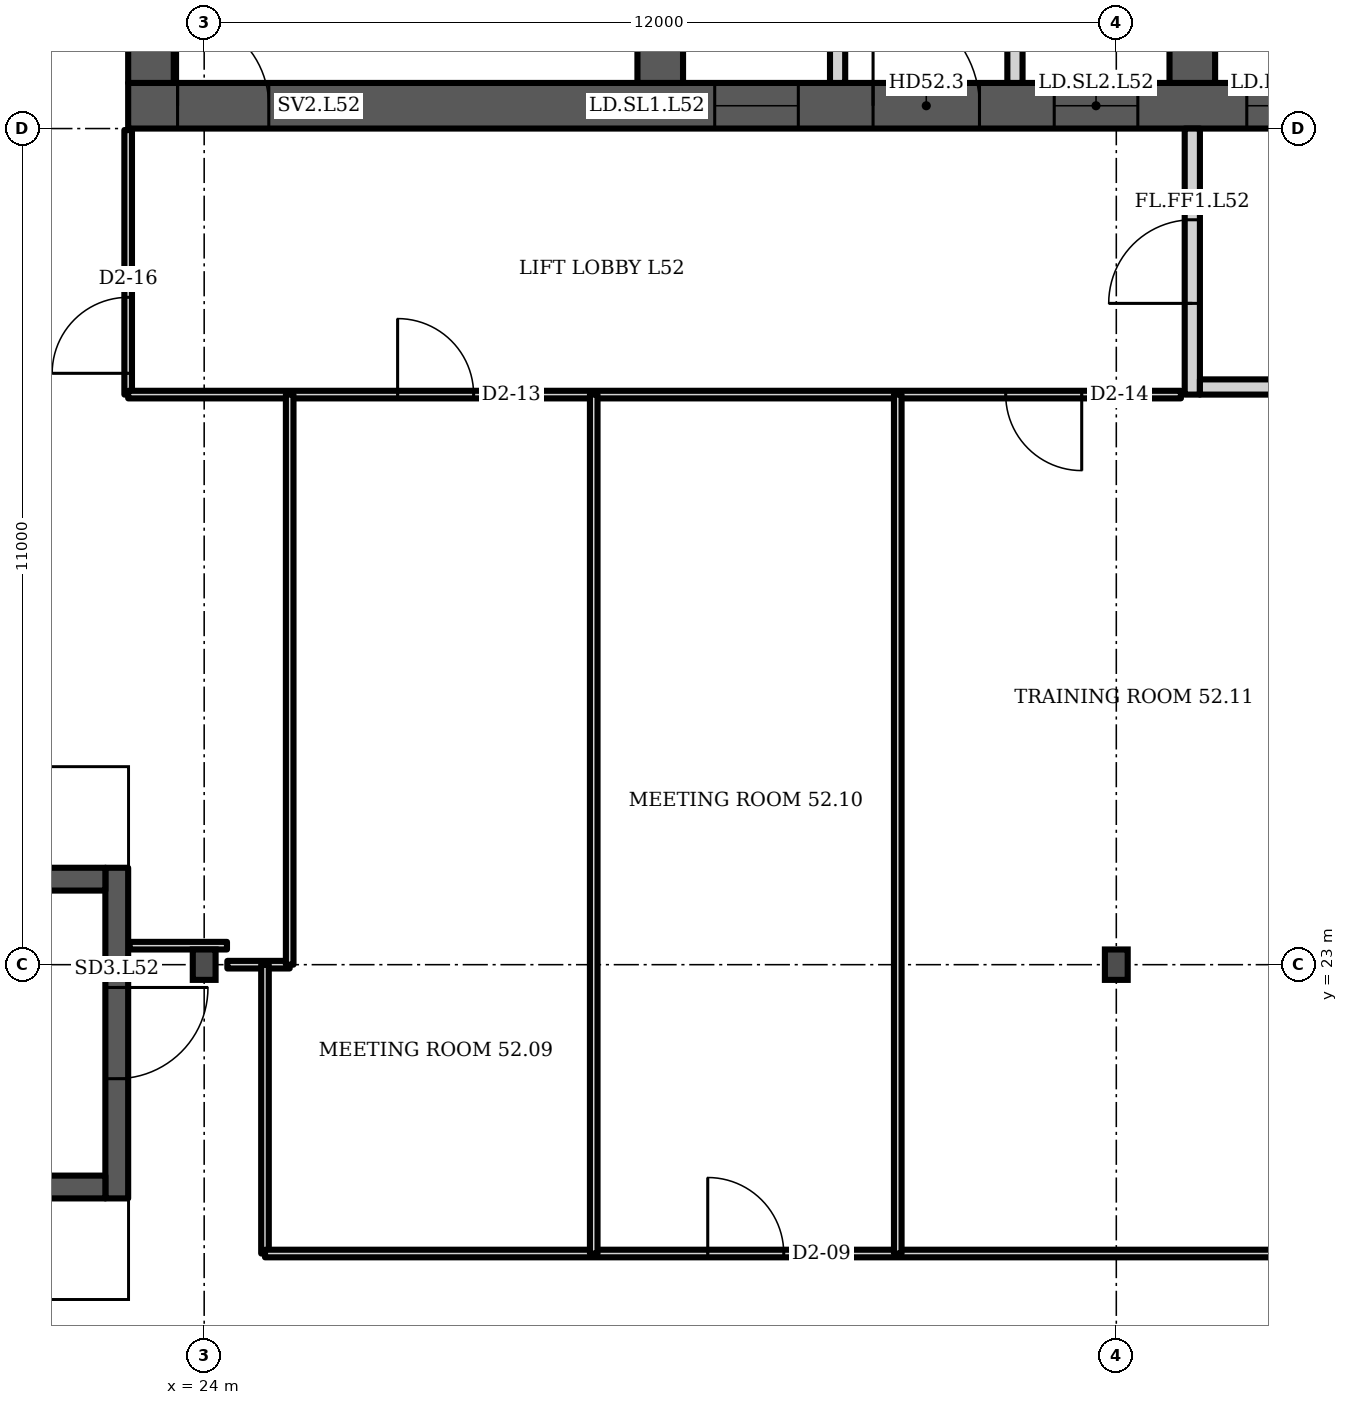
"""IFC4 building model, lengths in metres.
Left out: names, types, materials, properties, quantities, classifications, styles, units other than length and angle.
Written with IfcOpenShell. Run it as: python <this file> out.ifc"""

import sys

from ifc_helpers import new_model, si_unit, direction, frame, frame_2d, origin, origin_2d, place, context, subcontext, project, spatial, polyline, rectangle, i_section, outline, extrude, element, fill, save


model = new_model("IFC4")
c1 = context("Model", 3, precision=1e-05, world=origin(), true_north=direction((0.0, 1.0)))
c2 = subcontext(c1, "Body", "Model", "MODEL_VIEW")
j1 = project(units=[si_unit("LENGTHUNIT", "METRE"), si_unit("PLANEANGLEUNIT", "RADIAN")], contexts=[c1])
p1 = place(None, origin())
s1 = spatial("IfcSite", under=j1, at=p1, CompositionType="ELEMENT")
p2 = place(p1, origin())
s2 = spatial("IfcBuilding", under=s1, at=p2, CompositionType="ELEMENT")
p3 = place(p2, frame((0.0, 0.0, 210.7)))
s3 = spatial("IfcBuildingStorey", under=s2, at=p3, CompositionType="ELEMENT", Elevation=210.7)
p4 = place(p3, frame((23.0, 34.3, 0.0), z_axis=(0.0, 0.0, 1.0), x_axis=(1.0, 0.0, 0.0)))
e1 = element("IfcWall", 1, at=p4, inside=s3, PredefinedType="SHEAR", context=c2, shape_type="SweptSolid", body=[
    extrude(rectangle(XDim=35.0, YDim=0.6, at=frame_2d((17.5, 0.0))), origin(), (0.0, 0.0, 1.0), 3.6),
])
p5 = place(p4, frame((0.65, 0.0, 0.0)))
e2 = element("IfcOpeningElement", 2, at=p5, cuts=e1, PredefinedType="OPENING", context=c2, shape_type="SweptSolid", body=[
    extrude(rectangle(XDim=1.2, YDim=2.1, at=frame_2d((0.6, 1.05))), frame((0.0, 0.31, 0.0), z_axis=(0.0, -1.0, 0.0), x_axis=(1.0, 0.0, 0.0)), (0.0, 0.0, 1.0), 0.62),
])
p6 = place(p4, frame((7.717, 0.0, 0.0)))
e3 = element("IfcOpeningElement", 3, at=p6, cuts=e1, PredefinedType="OPENING", context=c2, shape_type="SweptSolid", body=[
    extrude(rectangle(XDim=1.1, YDim=2.1, at=frame_2d((0.55, 1.05))), frame((0.0, 0.31, 0.0), z_axis=(0.0, -1.0, 0.0), x_axis=(1.0, 0.0, 0.0)), (0.0, 0.0, 1.0), 0.62),
])
p7 = place(p4, frame((12.183, 0.0, 0.0)))
e4 = element("IfcOpeningElement", 4, at=p7, cuts=e1, PredefinedType="OPENING", context=c2, shape_type="SweptSolid", body=[
    extrude(rectangle(XDim=1.1, YDim=2.1, at=frame_2d((0.55, 1.05))), frame((0.0, 0.31, 0.0), z_axis=(0.0, -1.0, 0.0), x_axis=(1.0, 0.0, 0.0)), (0.0, 0.0, 1.0), 0.62),
])
p8 = place(p4, frame((9.8, 0.0, 0.0)))
e5 = element("IfcOpeningElement", 5, at=p8, cuts=e1, PredefinedType="OPENING", context=c2, shape_type="SweptSolid", body=[
    extrude(rectangle(XDim=1.4, YDim=2.1, at=frame_2d((0.7, 1.05))), frame((0.0, 0.31, 0.0), z_axis=(0.0, -1.0, 0.0), x_axis=(1.0, 0.0, 0.0)), (0.0, 0.0, 1.0), 0.62),
])
p9 = place(p4, frame((14.717, 0.0, 0.0)))
e6 = element("IfcOpeningElement", 6, at=p9, cuts=e1, PredefinedType="OPENING", context=c2, shape_type="SweptSolid", body=[
    extrude(rectangle(XDim=1.1, YDim=2.1, at=frame_2d((0.55, 1.05))), frame((0.0, 0.31, 0.0), z_axis=(0.0, -1.0, 0.0), x_axis=(1.0, 0.0, 0.0)), (0.0, 0.0, 1.0), 0.62),
])
p10 = place(p4, frame((16.95, 0.0, 0.0)))
e7 = element("IfcOpeningElement", 7, at=p10, cuts=e1, PredefinedType="OPENING", context=c2, shape_type="SweptSolid", body=[
    extrude(rectangle(XDim=1.1, YDim=2.1, at=frame_2d((0.55, 1.05))), frame((0.0, 0.31, 0.0), z_axis=(0.0, -1.0, 0.0), x_axis=(1.0, 0.0, 0.0)), (0.0, 0.0, 1.0), 0.62),
])
p11 = place(p4, frame((19.183, 0.0, 0.0)))
e8 = element("IfcOpeningElement", 8, at=p11, cuts=e1, PredefinedType="OPENING", context=c2, shape_type="SweptSolid", body=[
    extrude(rectangle(XDim=1.1, YDim=2.1, at=frame_2d((0.55, 1.05))), frame((0.0, 0.31, 0.0), z_axis=(0.0, -1.0, 0.0), x_axis=(1.0, 0.0, 0.0)), (0.0, 0.0, 1.0), 0.62),
])
p12 = place(p4, frame((26.15, 0.0, 0.0)))
e9 = element("IfcOpeningElement", 9, at=p12, cuts=e1, PredefinedType="OPENING", context=c2, shape_type="SweptSolid", body=[
    extrude(rectangle(XDim=1.2, YDim=2.1, at=frame_2d((0.6, 1.05))), frame((0.0, 0.31, 0.0), z_axis=(0.0, -1.0, 0.0), x_axis=(1.0, 0.0, 0.0)), (0.0, 0.0, 1.0), 0.62),
])
p13 = place(p4, frame((28.767, 0.0, 0.0)))
e10 = element("IfcOpeningElement", 10, at=p13, cuts=e1, PredefinedType="OPENING", context=c2, shape_type="SweptSolid", body=[
    extrude(rectangle(XDim=1.0, YDim=2.1, at=frame_2d((0.5, 1.05))), frame((0.0, 0.31, 0.0), z_axis=(0.0, -1.0, 0.0), x_axis=(1.0, 0.0, 0.0)), (0.0, 0.0, 1.0), 0.62),
])
p14 = place(p4, frame((33.083, 0.0, 0.0)))
e11 = element("IfcOpeningElement", 11, at=p14, cuts=e1, PredefinedType="OPENING", context=c2, shape_type="SweptSolid", body=[
    extrude(rectangle(XDim=1.0, YDim=2.1, at=frame_2d((0.5, 1.05))), frame((0.0, 0.31, 0.0), z_axis=(0.0, -1.0, 0.0), x_axis=(1.0, 0.0, 0.0)), (0.0, 0.0, 1.0), 0.62),
])
p15 = place(p4, frame((30.8, 0.0, 0.0)))
e12 = element("IfcOpeningElement", 12, at=p15, cuts=e1, PredefinedType="OPENING", context=c2, shape_type="SweptSolid", body=[
    extrude(rectangle(XDim=1.4, YDim=2.1, at=frame_2d((0.7, 1.05))), frame((0.0, 0.31, 0.0), z_axis=(0.0, -1.0, 0.0), x_axis=(1.0, 0.0, 0.0)), (0.0, 0.0, 1.0), 0.62),
])
p16 = place(p3, frame((23.3, 34.6, 0.0), z_axis=(0.0, 0.0, 1.0), x_axis=(0.0, 1.0, 0.0)))
e13 = element("IfcWall", 13, at=p16, inside=s3, PredefinedType="SHEAR", context=c2, shape_type="SweptSolid", body=[
    extrude(rectangle(XDim=13.585, YDim=0.6, at=frame_2d((6.792, 0.0))), origin(), (0.0, 0.0, 1.0), 3.6),
])
p17 = place(p3, frame((30.0, 34.6, 0.0), z_axis=(0.0, 0.0, 1.0), x_axis=(0.0, 1.0, 0.0)))
e14 = element("IfcWall", 14, at=p17, inside=s3, PredefinedType="SHEAR", context=c2, shape_type="SweptSolid", body=[
    extrude(rectangle(XDim=14.171, YDim=0.6, at=frame_2d((7.085, 0.0))), origin(), (0.0, 0.0, 1.0), 3.6),
])
p18 = place(p17, frame((3.8, 0.0, 0.0)))
e15 = element("IfcOpeningElement", 15, at=p18, cuts=e14, PredefinedType="OPENING", context=c2, shape_type="SweptSolid", body=[
    extrude(rectangle(XDim=1.1, YDim=2.1, at=frame_2d((0.55, 1.05))), frame((0.0, 0.31, 0.0), z_axis=(0.0, -1.0, 0.0), x_axis=(1.0, 0.0, 0.0)), (0.0, 0.0, 1.0), 0.62),
])
p19 = place(p3, frame((37.0, 34.6, 0.0), z_axis=(0.0, 0.0, 1.0), x_axis=(0.0, 1.0, 0.0)))
e16 = element("IfcWall", 16, at=p19, inside=s3, PredefinedType="SHEAR", context=c2, shape_type="SweptSolid", body=[
    extrude(rectangle(XDim=14.784, YDim=0.6, at=frame_2d((7.392, 0.0))), origin(), (0.0, 0.0, 1.0), 3.6),
])
p20 = place(p19, frame((11.302, 0.0, 0.0)))
e17 = element("IfcOpeningElement", 17, at=p20, cuts=e16, PredefinedType="OPENING", context=c2, shape_type="SweptSolid", body=[
    extrude(rectangle(XDim=1.0, YDim=2.1, at=frame_2d((0.5, 1.05))), frame((0.0, 0.31, 0.0), z_axis=(0.0, -1.0, 0.0), x_axis=(1.0, 0.0, 0.0)), (0.0, 0.0, 1.0), 0.62),
])
p21 = place(p19, frame((3.8, 0.0, 0.0)))
e18 = element("IfcOpeningElement", 18, at=p21, cuts=e16, PredefinedType="OPENING", context=c2, shape_type="SweptSolid", body=[
    extrude(rectangle(XDim=1.1, YDim=2.1, at=frame_2d((0.55, 1.05))), frame((0.0, 0.31, 0.0), z_axis=(0.0, -1.0, 0.0), x_axis=(1.0, 0.0, 0.0)), (0.0, 0.0, 1.0), 0.62),
])
for number, where, z_axis, x_axis in (
    (19, (24.0, 23.0, 0.0), (0.0, 0.0, 1.0), (1.0, 0.0, 0.0)),
    (20, (36.0, 23.0, 0.0), (0.0, 0.0, 1.0), (1.0, 0.0, 0.0)),
):
    element("IfcColumn", number, at=place(p3, frame(where, z_axis=z_axis, x_axis=x_axis)), inside=s3, PredefinedType="COLUMN", context=c2, shape_type="SweptSolid", body=[
        extrude(i_section(OverallWidth=0.3, OverallDepth=0.4, WebThickness=0.013, FlangeThickness=0.024, FilletRadius=0.027, at=origin_2d()), origin(), (0.0, 0.0, 1.0), 3.6),
    ])
p22 = place(p3, frame((0.0, 0.0, -0.0)))
e21 = element("IfcWall", 21, at=p22, inside=s3, PredefinedType="PARTITIONING", context=c2, shape_type="SweptSolid", body=[
    extrude(outline(polyline([(32.233, 37.45), (30.3, 37.45), (30.3, 37.65), (32.233, 37.65), (32.433, 37.65), (32.433, 34.6), (32.233, 34.6), (32.233, 37.45)])), origin(), (0.0, 0.0, 1.0), 3.2),
])
p23 = place(p3, frame((0.0, 0.0, -0.0)))
e22 = element("IfcWall", 22, at=p23, inside=s3, PredefinedType="PARTITIONING", context=c2, shape_type="SweptSolid", body=[
    extrude(outline(polyline([(34.567, 37.65), (34.767, 37.65), (36.7, 37.65), (36.7, 37.45), (34.767, 37.45), (34.767, 34.6), (34.567, 34.6), (34.567, 37.65)])), origin(), (0.0, 0.0, 1.0), 3.2),
])
p24 = place(p3, frame((0.0, 0.0, -0.0)))
e23 = element("IfcWall", 23, at=p24, inside=s3, PredefinedType="PARTITIONING", context=c2, shape_type="SweptSolid", body=[
    extrude(outline(polyline([(41.567, 37.1), (39.433, 37.1), (39.433, 34.6), (39.233, 34.6), (39.233, 37.45), (37.3, 37.45), (37.3, 37.65), (39.233, 37.65), (39.433, 37.65), (39.433, 37.3), (41.567, 37.3), (41.567, 37.35), (41.767, 37.35), (43.7, 37.35), (43.7, 37.15), (41.767, 37.15), (41.767, 34.6), (41.567, 34.6), (41.567, 37.1)])), origin(), (0.0, 0.0, 1.0), 3.2),
])
p25 = place(p3, frame((37.0, 30.5, 0.0), z_axis=(0.0, 0.0, 1.0), x_axis=(0.0, 1.0, 0.0)))
e24 = element("IfcWall", 24, at=p25, inside=s3, PredefinedType="PARTITIONING", context=c2, shape_type="SweptSolid", body=[
    extrude(rectangle(XDim=3.5, YDim=0.2, at=frame_2d((1.75, 0.0))), origin(), (0.0, 0.0, 1.0), 3.2),
])
p26 = place(p25, frame((1.2, 0.0, 0.0)))
e25 = element("IfcOpeningElement", 25, at=p26, cuts=e24, PredefinedType="OPENING", context=c2, shape_type="SweptSolid", body=[
    extrude(rectangle(XDim=1.1, YDim=2.1, at=frame_2d((0.55, 1.05))), frame((0.0, 0.11, 0.0), z_axis=(0.0, -1.0, 0.0), x_axis=(1.0, 0.0, 0.0)), (0.0, 0.0, 1.0), 0.22),
])
p27 = place(p3, frame((37.1, 30.6, 0.0), z_axis=(0.0, 0.0, 1.0), x_axis=(1.0, 0.0, 0.0)))
e26 = element("IfcWall", 26, at=p27, inside=s3, PredefinedType="PARTITIONING", context=c2, shape_type="SweptSolid", body=[
    extrude(rectangle(XDim=2.8, YDim=0.2, at=frame_2d((1.4, 0.0))), origin(), (0.0, 0.0, 1.0), 3.2),
])
p28 = place(p3, frame((22.85, 19.925, 0.0), z_axis=(0.0, 0.0, 1.0), x_axis=(0.0, 1.0, 0.0)))
e27 = element("IfcWall", 27, at=p28, inside=s3, PredefinedType="SHEAR", context=c2, shape_type="SweptSolid", body=[
    extrude(rectangle(XDim=4.35, YDim=0.3, at=frame_2d((2.175, 0.0))), origin(), (0.0, 0.0, 1.0), 3.2),
])
p29 = place(p28, frame((1.575, 0.0, 0.0)))
e28 = element("IfcOpeningElement", 28, at=p29, cuts=e27, PredefinedType="OPENING", context=c2, shape_type="SweptSolid", body=[
    extrude(rectangle(XDim=1.2, YDim=2.1, at=frame_2d((0.6, 1.05))), frame((0.0, 0.16, 0.0), z_axis=(0.0, -1.0, 0.0), x_axis=(1.0, 0.0, 0.0)), (0.0, 0.0, 1.0), 0.32),
])
p30 = place(p3, frame((23.0, 30.5, 0.0), z_axis=(0.0, 0.0, 1.0), x_axis=(0.0, 1.0, 0.0)))
e29 = element("IfcWall", 29, at=p30, inside=s3, PredefinedType="PARTITIONING", context=c2, shape_type="SweptSolid", body=[
    extrude(rectangle(XDim=3.48, YDim=0.1, at=frame_2d((1.74, 0.0))), origin(), (0.0, 0.0, 1.0), 3.2),
])
p31 = place(p30, frame((0.28, 0.0, 0.0)))
e30 = element("IfcOpeningElement", 30, at=p31, cuts=e29, PredefinedType="OPENING", context=c2, shape_type="SweptSolid", body=[
    extrude(rectangle(XDim=1.0, YDim=2.1, at=frame_2d((0.5, 1.05))), frame((0.0, 0.06, 0.0), z_axis=(0.0, -1.0, 0.0), x_axis=(1.0, 0.0, 0.0)), (0.0, 0.0, 1.0), 0.12),
])
p32 = place(p3, frame((23.0, 30.5, 0.0), z_axis=(0.0, 0.0, 1.0), x_axis=(1.0, 0.0, 0.0)))
e31 = element("IfcWall", 31, at=p32, inside=s3, PredefinedType="PARTITIONING", context=c2, shape_type="SweptSolid", body=[
    extrude(rectangle(XDim=13.85, YDim=0.1, at=frame_2d((6.925, 0.0))), origin(), (0.0, 0.0, 1.0), 3.2),
])
p33 = place(p32, frame((3.545, 0.0, 0.0)))
e32 = element("IfcOpeningElement", 32, at=p33, cuts=e31, PredefinedType="OPENING", context=c2, shape_type="SweptSolid", body=[
    extrude(rectangle(XDim=1.0, YDim=2.1, at=frame_2d((0.5, 1.05))), frame((0.0, 0.06, 0.0), z_axis=(0.0, -1.0, 0.0), x_axis=(1.0, 0.0, 0.0)), (0.0, 0.0, 1.0), 0.12),
])
p34 = place(p32, frame((11.545, 0.0, 0.0)))
e33 = element("IfcOpeningElement", 33, at=p34, cuts=e31, PredefinedType="OPENING", context=c2, shape_type="SweptSolid", body=[
    extrude(rectangle(XDim=1.0, YDim=2.1, at=frame_2d((0.5, 1.05))), frame((0.0, 0.06, 0.0), z_axis=(0.0, -1.0, 0.0), x_axis=(1.0, 0.0, 0.0)), (0.0, 0.0, 1.0), 0.12),
])
p35 = place(p3, frame((23.02, 23.25, 0.0), z_axis=(0.0, 0.0, 1.0), x_axis=(1.0, 0.0, 0.0)))
e34 = element("IfcWall", 34, at=p35, inside=s3, PredefinedType="PARTITIONING", context=c2, shape_type="SweptSolid", body=[
    extrude(rectangle(XDim=1.28, YDim=0.1, at=frame_2d((0.64, 0.0))), origin(), (0.0, 0.0, 1.0), 3.2),
])
p36 = place(p3, frame((24.305, 23.0, 0.0), z_axis=(0.0, 0.0, 1.0), x_axis=(1.0, 0.0, 0.0)))
e35 = element("IfcWall", 35, at=p36, inside=s3, PredefinedType="PARTITIONING", context=c2, shape_type="SweptSolid", body=[
    extrude(rectangle(XDim=0.82, YDim=0.1, at=frame_2d((0.41, 0.0))), origin(), (0.0, 0.0, 1.0), 3.2),
])
p37 = place(p3, frame((24.8, 19.2, 0.0), z_axis=(0.0, 0.0, 1.0), x_axis=(0.0, 1.0, 0.0)))
e36 = element("IfcWall", 36, at=p37, inside=s3, PredefinedType="PARTITIONING", context=c2, shape_type="SweptSolid", body=[
    extrude(rectangle(XDim=3.8, YDim=0.1, at=frame_2d((1.9, 0.0))), origin(), (0.0, 0.0, 1.0), 3.2),
])
p38 = place(p3, frame((24.8, 19.2, 0.0), z_axis=(0.0, 0.0, 1.0), x_axis=(1.0, 0.0, 0.0)))
e37 = element("IfcWall", 37, at=p38, inside=s3, PredefinedType="PARTITIONING", context=c2, shape_type="SweptSolid", body=[
    extrude(rectangle(XDim=20.76, YDim=0.1, at=frame_2d((10.38, 0.0))), origin(), (0.0, 0.0, 1.0), 3.2),
])
p39 = place(p38, frame((5.825, 0.0, 0.0)))
e38 = element("IfcOpeningElement", 38, at=p39, cuts=e37, PredefinedType="OPENING", context=c2, shape_type="SweptSolid", body=[
    extrude(rectangle(XDim=1.0, YDim=2.1, at=frame_2d((0.5, 1.05))), frame((0.0, 0.06, 0.0), z_axis=(0.0, -1.0, 0.0), x_axis=(1.0, 0.0, 0.0)), (0.0, 0.0, 1.0), 0.12),
])
p40 = place(p3, frame((25.125, 23.0, 0.0), z_axis=(0.0, 0.0, 1.0), x_axis=(0.0, 1.0, 0.0)))
e39 = element("IfcWall", 39, at=p40, inside=s3, PredefinedType="PARTITIONING", context=c2, shape_type="SweptSolid", body=[
    extrude(rectangle(XDim=7.5, YDim=0.1, at=frame_2d((3.75, 0.0))), origin(), (0.0, 0.0, 1.0), 3.2),
])
for number, where, z_axis, x_axis in (
    (40, (29.125, 19.2, 0.0), (0.0, 0.0, 1.0), (0.0, 1.0, 0.0)),
    (41, (33.125, 19.2, 0.0), (0.0, 0.0, 1.0), (0.0, 1.0, 0.0)),
):
    element("IfcWall", number, at=place(p3, frame(where, z_axis=z_axis, x_axis=x_axis)), inside=s3, PredefinedType="PARTITIONING", context=c2, shape_type="SweptSolid", body=[
        extrude(rectangle(XDim=11.3, YDim=0.1, at=frame_2d((5.65, 0.0))), origin(), (0.0, 0.0, 1.0), 3.2),
    ])
for number, where, z_axis, x_axis in (
    (42, (15.2, 20.075, 0.0), (0.0, 0.0, 1.0), (1.0, 0.0, 0.0)),
    (43, (15.2, 24.125, 0.0), (0.0, 0.0, 1.0), (1.0, 0.0, 0.0)),
):
    element("IfcWall", number, at=place(p3, frame(where, z_axis=z_axis, x_axis=x_axis)), inside=s3, PredefinedType="SHEAR", context=c2, shape_type="SweptSolid", body=[
        extrude(rectangle(XDim=7.5, YDim=0.3, at=frame_2d((3.75, 0.0))), origin(), (0.0, 0.0, 1.0), 3.2),
    ])
p41 = place(p5, origin())
e44 = element("IfcDoor", 44, at=p41, inside=s3, OperationType="SINGLE_SWING_LEFT", PredefinedType="DOOR", context=c2, shape_type="SweptSolid", body=[
    extrude(rectangle(XDim=1.2, YDim=2.1, at=frame_2d((0.6, 1.05))), frame((0.0, 0.025, 0.0), z_axis=(0.0, -1.0, 0.0), x_axis=(1.0, 0.0, 0.0)), (0.0, 0.0, 1.0), 0.05),
])
fill(e2, e44)
p42 = place(p6, origin())
e45 = element("IfcDoor", 45, at=p42, inside=s3, OperationType="DOUBLE_DOOR_SLIDING", PredefinedType="DOOR", context=c2, shape_type="SweptSolid", body=[
    extrude(rectangle(XDim=1.1, YDim=2.1, at=frame_2d((0.55, 1.05))), frame((0.0, 0.025, 0.0), z_axis=(0.0, -1.0, 0.0), x_axis=(1.0, 0.0, 0.0)), (0.0, 0.0, 1.0), 0.05),
])
fill(e3, e45)
p43 = place(p7, origin())
e46 = element("IfcDoor", 46, at=p43, inside=s3, OperationType="DOUBLE_DOOR_SLIDING", PredefinedType="DOOR", context=c2, shape_type="SweptSolid", body=[
    extrude(rectangle(XDim=1.1, YDim=2.1, at=frame_2d((0.55, 1.05))), frame((0.0, 0.025, 0.0), z_axis=(0.0, -1.0, 0.0), x_axis=(1.0, 0.0, 0.0)), (0.0, 0.0, 1.0), 0.05),
])
fill(e4, e46)
p44 = place(p8, origin())
e47 = element("IfcDoor", 47, at=p44, inside=s3, OperationType="DOUBLE_DOOR_SINGLE_SWING", PredefinedType="DOOR", context=c2, shape_type="SweptSolid", body=[
    extrude(rectangle(XDim=1.4, YDim=2.1, at=frame_2d((0.7, 1.05))), frame((0.0, 0.025, 0.0), z_axis=(0.0, -1.0, 0.0), x_axis=(1.0, 0.0, 0.0)), (0.0, 0.0, 1.0), 0.05),
])
fill(e5, e47)
p45 = place(p9, origin())
e48 = element("IfcDoor", 48, at=p45, inside=s3, OperationType="DOUBLE_DOOR_SLIDING", PredefinedType="DOOR", context=c2, shape_type="SweptSolid", body=[
    extrude(rectangle(XDim=1.1, YDim=2.1, at=frame_2d((0.55, 1.05))), frame((0.0, 0.025, 0.0), z_axis=(0.0, -1.0, 0.0), x_axis=(1.0, 0.0, 0.0)), (0.0, 0.0, 1.0), 0.05),
])
fill(e6, e48)
p46 = place(p26, origin())
e49 = element("IfcDoor", 49, at=p46, inside=s3, OperationType="SINGLE_SWING_LEFT", PredefinedType="DOOR", context=c2, shape_type="SweptSolid", body=[
    extrude(rectangle(XDim=1.1, YDim=2.1, at=frame_2d((0.55, 1.05))), frame((0.0, 0.025, 0.0), z_axis=(0.0, -1.0, 0.0), x_axis=(1.0, 0.0, 0.0)), (0.0, 0.0, 1.0), 0.05),
])
fill(e25, e49)
p47 = place(p29, origin())
e50 = element("IfcDoor", 50, at=p47, inside=s3, OperationType="SINGLE_SWING_RIGHT", PredefinedType="DOOR", context=c2, shape_type="SweptSolid", body=[
    extrude(rectangle(XDim=1.2, YDim=2.1, at=frame_2d((0.6, 1.05))), frame((0.0, 0.025, 0.0), z_axis=(0.0, -1.0, 0.0), x_axis=(1.0, 0.0, 0.0)), (0.0, 0.0, 1.0), 0.05),
])
fill(e28, e50)
p48 = place(p39, origin())
e51 = element("IfcDoor", 51, at=p48, inside=s3, OperationType="SINGLE_SWING_LEFT", PredefinedType="DOOR", context=c2, shape_type="SweptSolid", body=[
    extrude(rectangle(XDim=1.0, YDim=2.1, at=frame_2d((0.5, 1.05))), frame((0.0, 0.025, 0.0), z_axis=(0.0, -1.0, 0.0), x_axis=(1.0, 0.0, 0.0)), (0.0, 0.0, 1.0), 0.05),
])
fill(e38, e51)
p49 = place(p33, origin())
e52 = element("IfcDoor", 52, at=p49, inside=s3, OperationType="SINGLE_SWING_LEFT", PredefinedType="DOOR", context=c2, shape_type="SweptSolid", body=[
    extrude(rectangle(XDim=1.0, YDim=2.1, at=frame_2d((0.5, 1.05))), frame((0.0, 0.025, 0.0), z_axis=(0.0, -1.0, 0.0), x_axis=(1.0, 0.0, 0.0)), (0.0, 0.0, 1.0), 0.05),
])
fill(e32, e52)
p50 = place(p34, origin())
e53 = element("IfcDoor", 53, at=p50, inside=s3, OperationType="SINGLE_SWING_RIGHT", PredefinedType="DOOR", context=c2, shape_type="SweptSolid", body=[
    extrude(rectangle(XDim=1.0, YDim=2.1, at=frame_2d((0.5, 1.05))), frame((0.0, 0.025, 0.0), z_axis=(0.0, -1.0, 0.0), x_axis=(1.0, 0.0, 0.0)), (0.0, 0.0, 1.0), 0.05),
])
fill(e33, e53)
p51 = place(p31, origin())
e54 = element("IfcDoor", 54, at=p51, inside=s3, OperationType="SINGLE_SWING_LEFT", PredefinedType="DOOR", context=c2, shape_type="SweptSolid", body=[
    extrude(rectangle(XDim=1.0, YDim=2.1, at=frame_2d((0.5, 1.05))), frame((0.0, 0.025, 0.0), z_axis=(0.0, -1.0, 0.0), x_axis=(1.0, 0.0, 0.0)), (0.0, 0.0, 1.0), 0.05),
])
fill(e30, e54)
save(model, sys.argv[1])
